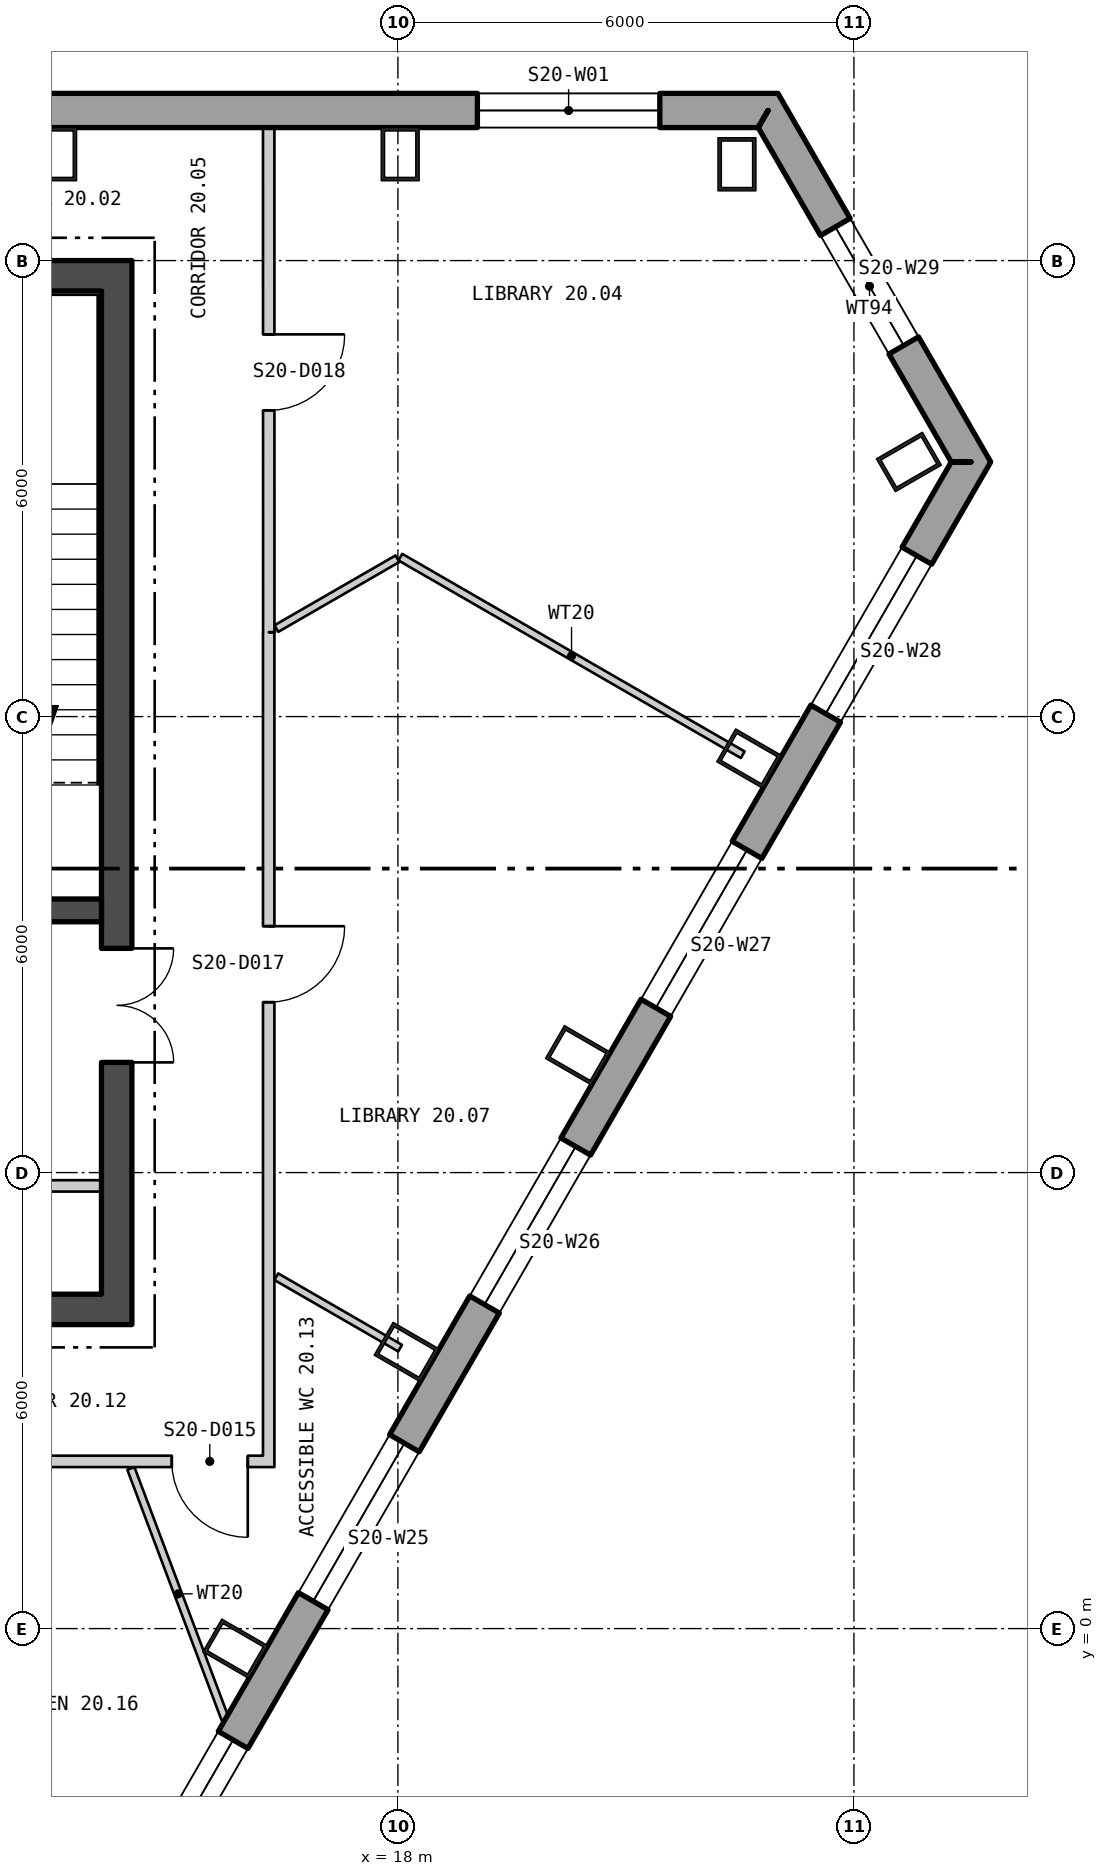
"""IFC4 building model, lengths in metres.
Left out: names, types, materials, properties, quantities, classifications, styles, units other than length and angle.
Written with IfcOpenShell. Run it as: python <this file> out.ifc"""

import sys

from ifc_helpers import new_model, si_unit, direction, frame, frame_2d, origin, origin_2d, place, context, subcontext, project, spatial, polyline, rectangle, hollow_rectangle, outline, extrude, element, fill, save


model = new_model("IFC4")
c1 = context("Model", 3, precision=1e-05, world=origin(), true_north=direction((0.0, 1.0)))
c2 = subcontext(c1, "Body", "Model", "MODEL_VIEW")
j1 = project(units=[si_unit("LENGTHUNIT", "METRE"), si_unit("PLANEANGLEUNIT", "RADIAN")], contexts=[c1])
p1 = place(None, origin())
s1 = spatial("IfcSite", under=j1, at=p1, CompositionType="ELEMENT")
p2 = place(p1, origin())
s2 = spatial("IfcBuilding", under=s1, at=p2, CompositionType="ELEMENT")
p3 = place(p2, frame((0.0, 0.0, 268.8)))
s3 = spatial("IfcBuildingStorey", under=s2, at=p3, CompositionType="ELEMENT", Elevation=268.8)
for number, where, z_axis, x_axis in (
    (1, (22.461, 19.267, 0.0), (0.0, 0.0, 1.0), (-1.0, 0.0, 0.0)),
    (2, (18.03, 19.4, 0.0), (0.0, 0.0, 1.0), (-1.0, 0.0, 0.0)),
    (3, (13.523, 19.4, 0.0), (0.0, 0.0, 1.0), (-1.0, 0.0, 0.0)),
    (4, (15.861, -0.265, 0.0), (0.0, 0.0, 1.0), (0.5, 0.866, 0.0)),
    (5, (18.115, 3.639, 0.0), (0.0, 0.0, 1.0), (0.5, 0.866, 0.0)),
    (6, (20.369, 7.543, 0.0), (0.0, 0.0, 1.0), (0.5, 0.866, 0.0)),
    (7, (22.622, 11.447, 0.0), (0.0, 0.0, 1.0), (0.5, 0.866, 0.0)),
    (8, (24.723, 15.35, 0.0), (0.0, 0.0, 1.0), (-0.5, 0.866, 0.0)),
):
    element("IfcColumn", number, at=place(p3, frame(where, z_axis=z_axis, x_axis=x_axis)), inside=s3, PredefinedType="COLUMN", context=c2, shape_type="SweptSolid", body=[
        extrude(hollow_rectangle(XDim=0.5, YDim=0.7, WallThickness=0.045, at=origin_2d()), origin(), (0.0, 0.0, 1.0), 3.9),
    ])
p4 = place(p3, frame((22.87, 19.975, -0.4), z_axis=(0.0, 0.0, 1.0), x_axis=(-1.0, 0.0, 0.0)))
e9 = element("IfcWall", 9, at=p4, inside=s3, PredefinedType="SOLIDWALL", context=c2, shape_type="SweptSolid", body=[
    extrude(outline(polyline([(-0.13, -0.225), (45.87, -0.225), (45.61, 0.225), (0.13, 0.225), (-0.13, -0.225)])), origin(), (0.0, 0.0, 1.0), 3.9),
])
p5 = place(p4, frame((1.424, 0.0, 1.3)))
e10 = element("IfcOpeningElement", 10, at=p5, cuts=e9, PredefinedType="OPENING", context=c2, shape_type="SweptSolid", body=[
    extrude(rectangle(XDim=2.4, YDim=2.0, at=frame_2d((1.2, 1.0))), frame((0.0, 0.235, 0.0), z_axis=(0.0, -1.0, 0.0), x_axis=(1.0, 0.0, 0.0)), (0.0, 0.0, 1.0), 0.47),
])
p6 = place(p4, frame((14.909, 0.0, 1.3)))
e11 = element("IfcOpeningElement", 11, at=p6, cuts=e9, PredefinedType="OPENING", context=c2, shape_type="SweptSolid", body=[
    extrude(rectangle(XDim=2.4, YDim=2.0, at=frame_2d((1.2, 1.0))), frame((0.0, 0.235, 0.0), z_axis=(0.0, -1.0, 0.0), x_axis=(1.0, 0.0, 0.0)), (0.0, 0.0, 1.0), 0.47),
])
p7 = place(p4, frame((19.416, 0.0, 1.3)))
e12 = element("IfcOpeningElement", 12, at=p7, cuts=e9, PredefinedType="OPENING", context=c2, shape_type="SweptSolid", body=[
    extrude(rectangle(XDim=2.4, YDim=2.0, at=frame_2d((1.2, 1.0))), frame((0.0, 0.235, 0.0), z_axis=(0.0, -1.0, 0.0), x_axis=(1.0, 0.0, 0.0)), (0.0, 0.0, 1.0), 0.47),
])
p8 = place(p4, frame((23.924, 0.0, 1.3)))
e13 = element("IfcOpeningElement", 13, at=p8, cuts=e9, PredefinedType="OPENING", context=c2, shape_type="SweptSolid", body=[
    extrude(rectangle(XDim=2.4, YDim=2.0, at=frame_2d((1.2, 1.0))), frame((0.0, 0.235, 0.0), z_axis=(0.0, -1.0, 0.0), x_axis=(1.0, 0.0, 0.0)), (0.0, 0.0, 1.0), 0.47),
])
p9 = place(p4, frame((28.431, 0.0, 1.3)))
e14 = element("IfcOpeningElement", 14, at=p9, cuts=e9, PredefinedType="OPENING", context=c2, shape_type="SweptSolid", body=[
    extrude(rectangle(XDim=2.4, YDim=2.0, at=frame_2d((1.2, 1.0))), frame((0.0, 0.235, 0.0), z_axis=(0.0, -1.0, 0.0), x_axis=(1.0, 0.0, 0.0)), (0.0, 0.0, 1.0), 0.47),
])
p10 = place(p4, frame((32.939, 0.0, 1.3)))
e15 = element("IfcOpeningElement", 15, at=p10, cuts=e9, PredefinedType="OPENING", context=c2, shape_type="SweptSolid", body=[
    extrude(rectangle(XDim=2.4, YDim=2.0, at=frame_2d((1.2, 1.0))), frame((0.0, 0.235, 0.0), z_axis=(0.0, -1.0, 0.0), x_axis=(1.0, 0.0, 0.0)), (0.0, 0.0, 1.0), 0.47),
])
p11 = place(p4, frame((41.916, 0.0, 1.3)))
e16 = element("IfcOpeningElement", 16, at=p11, cuts=e9, PredefinedType="OPENING", context=c2, shape_type="SweptSolid", body=[
    extrude(rectangle(XDim=2.4, YDim=2.0, at=frame_2d((1.2, 1.0))), frame((0.0, 0.235, 0.0), z_axis=(0.0, -1.0, 0.0), x_axis=(1.0, 0.0, 0.0)), (0.0, 0.0, 1.0), 0.47),
])
p12 = place(p3, frame((2.67, -24.262, -0.18), z_axis=(0.0, 0.0, 1.0), x_axis=(0.499999764979, 0.866025539474, 0.0)))
e17 = element("IfcWall", 17, at=p12, inside=s3, PredefinedType="SOLIDWALL", context=c2, shape_type="SweptSolid", body=[
    extrude(outline(polyline([(-0.13, -0.225), (45.87, -0.225), (45.61, 0.225), (0.13, 0.225), (-0.13, -0.225)])), origin(), (0.0, 0.0, 1.0), 3.68),
])
p13 = place(p12, frame((1.424, 0.0, 1.08)))
e18 = element("IfcOpeningElement", 18, at=p13, cuts=e17, PredefinedType="OPENING", context=c2, shape_type="SweptSolid", body=[
    extrude(rectangle(XDim=2.4, YDim=2.0, at=frame_2d((1.2, 1.0))), frame((0.0, 0.235, 0.0), z_axis=(0.0, -1.0, 0.0), x_axis=(1.0, 0.0, 0.0)), (0.0, 0.0, 1.0), 0.47),
])
p14 = place(p12, frame((5.893, 0.0, 1.08)))
e19 = element("IfcOpeningElement", 19, at=p14, cuts=e17, PredefinedType="OPENING", context=c2, shape_type="SweptSolid", body=[
    extrude(rectangle(XDim=2.4, YDim=2.0, at=frame_2d((1.2, 1.0))), frame((0.0, 0.235, 0.0), z_axis=(0.0, -1.0, 0.0), x_axis=(1.0, 0.0, 0.0)), (0.0, 0.0, 1.0), 0.47),
])
p15 = place(p12, frame((10.401, 0.0, 1.08)))
e20 = element("IfcOpeningElement", 20, at=p15, cuts=e17, PredefinedType="OPENING", context=c2, shape_type="SweptSolid", body=[
    extrude(rectangle(XDim=2.4, YDim=2.0, at=frame_2d((1.2, 1.0))), frame((0.0, 0.235, 0.0), z_axis=(0.0, -1.0, 0.0), x_axis=(1.0, 0.0, 0.0)), (0.0, 0.0, 1.0), 0.47),
])
p16 = place(p12, frame((14.909, 0.0, 1.08)))
e21 = element("IfcOpeningElement", 21, at=p16, cuts=e17, PredefinedType="OPENING", context=c2, shape_type="SweptSolid", body=[
    extrude(rectangle(XDim=2.4, YDim=2.0, at=frame_2d((1.2, 1.0))), frame((0.0, 0.235, 0.0), z_axis=(0.0, -1.0, 0.0), x_axis=(1.0, 0.0, 0.0)), (0.0, 0.0, 1.0), 0.47),
])
p17 = place(p12, frame((23.924, 0.0, 1.08)))
e22 = element("IfcOpeningElement", 22, at=p17, cuts=e17, PredefinedType="OPENING", context=c2, shape_type="SweptSolid", body=[
    extrude(rectangle(XDim=2.4, YDim=2.0, at=frame_2d((1.2, 1.0))), frame((0.0, 0.235, 0.0), z_axis=(0.0, -1.0, 0.0), x_axis=(1.0, 0.0, 0.0)), (0.0, 0.0, 1.0), 0.47),
])
p18 = place(p12, frame((28.431, 0.0, 1.08)))
e23 = element("IfcOpeningElement", 23, at=p18, cuts=e17, PredefinedType="OPENING", context=c2, shape_type="SweptSolid", body=[
    extrude(rectangle(XDim=2.4, YDim=2.0, at=frame_2d((1.2, 1.0))), frame((0.0, 0.235, 0.0), z_axis=(0.0, -1.0, 0.0), x_axis=(1.0, 0.0, 0.0)), (0.0, 0.0, 1.0), 0.47),
])
p19 = place(p12, frame((32.939, 0.0, 1.08)))
e24 = element("IfcOpeningElement", 24, at=p19, cuts=e17, PredefinedType="OPENING", context=c2, shape_type="SweptSolid", body=[
    extrude(rectangle(XDim=2.4, YDim=2.0, at=frame_2d((1.2, 1.0))), frame((0.0, 0.235, 0.0), z_axis=(0.0, -1.0, 0.0), x_axis=(1.0, 0.0, 0.0)), (0.0, 0.0, 1.0), 0.47),
])
p20 = place(p12, frame((37.447, 0.0, 1.08)))
e25 = element("IfcOpeningElement", 25, at=p20, cuts=e17, PredefinedType="OPENING", context=c2, shape_type="SweptSolid", body=[
    extrude(rectangle(XDim=2.4, YDim=2.0, at=frame_2d((1.2, 1.0))), frame((0.0, 0.235, 0.0), z_axis=(0.0, -1.0, 0.0), x_axis=(1.0, 0.0, 0.0)), (0.0, 0.0, 1.0), 0.47),
])
p21 = place(p12, frame((41.916, 0.0, 1.08)))
e26 = element("IfcOpeningElement", 26, at=p21, cuts=e17, PredefinedType="OPENING", context=c2, shape_type="SweptSolid", body=[
    extrude(rectangle(XDim=2.4, YDim=2.0, at=frame_2d((1.2, 1.0))), frame((0.0, 0.235, 0.0), z_axis=(0.0, -1.0, 0.0), x_axis=(1.0, 0.0, 0.0)), (0.0, 0.0, 1.0), 0.47),
])
p22 = place(p3, frame((25.54, 15.35, -0.4), z_axis=(0.0, 0.0, 1.0), x_axis=(-0.500003961967, 0.866023116329, 0.0)))
e27 = element("IfcWall", 27, at=p22, inside=s3, PredefinedType="SOLIDWALL", context=c2, shape_type="SweptSolid", body=[
    extrude(outline(polyline([(-0.13, -0.225), (5.47, -0.225), (5.21, 0.225), (0.13, 0.225), (-0.13, -0.225)])), origin(), (0.0, 0.0, 1.0), 3.9),
])
p23 = place(p22, frame((1.77, 0.0, 1.3)))
e28 = element("IfcOpeningElement", 28, at=p23, cuts=e27, PredefinedType="OPENING", context=c2, shape_type="SweptSolid", body=[
    extrude(rectangle(XDim=1.8, YDim=2.0, at=frame_2d((0.9, 1.0))), frame((0.0, 0.235, 0.0), z_axis=(0.0, -1.0, 0.0), x_axis=(1.0, 0.0, 0.0)), (0.0, 0.0, 1.0), 0.47),
])
p24 = place(p3, frame((-14.5, 4.2, 0.0), z_axis=(0.0, 0.0, 1.0), x_axis=(1.0, 0.0, 0.0)))
e29 = element("IfcWall", 29, at=p24, inside=s3, PredefinedType="SHEAR", context=c2, shape_type="SweptSolid", body=[
    extrude(rectangle(XDim=29.0, YDim=0.4, at=frame_2d((14.5, 0.0))), origin(), (0.0, 0.0, 1.0), 3.7),
])
p25 = place(p24, frame((9.0, 0.0, 0.0)))
e30 = element("IfcOpeningElement", 30, at=p25, cuts=e29, PredefinedType="OPENING", context=c2, shape_type="SweptSolid", body=[
    extrude(rectangle(XDim=1.8, YDim=2.4, at=frame_2d((0.9, 1.2))), frame((0.0, 0.21, 0.0), z_axis=(0.0, -1.0, 0.0), x_axis=(1.0, 0.0, 0.0)), (0.0, 0.0, 1.0), 0.42),
])
p26 = place(p24, frame((19.0, 0.0, 0.0)))
e31 = element("IfcOpeningElement", 31, at=p26, cuts=e29, PredefinedType="OPENING", context=c2, shape_type="SweptSolid", body=[
    extrude(rectangle(XDim=1.8, YDim=2.4, at=frame_2d((0.9, 1.2))), frame((0.0, 0.21, 0.0), z_axis=(0.0, -1.0, 0.0), x_axis=(1.0, 0.0, 0.0)), (0.0, 0.0, 1.0), 0.42),
])
p27 = place(p3, frame((-14.5, 17.8, 0.0), z_axis=(0.0, 0.0, 1.0), x_axis=(1.0, 0.0, 0.0)))
e32 = element("IfcWall", 32, at=p27, inside=s3, PredefinedType="SHEAR", context=c2, shape_type="SweptSolid", body=[
    extrude(rectangle(XDim=29.0, YDim=0.4, at=frame_2d((14.5, 0.0))), origin(), (0.0, 0.0, 1.0), 3.7),
])
p28 = place(p3, frame((14.3, 4.4, 0.0), z_axis=(0.0, 0.0, 1.0), x_axis=(0.0, 1.0, 0.0)))
e33 = element("IfcWall", 33, at=p28, inside=s3, PredefinedType="SHEAR", context=c2, shape_type="SweptSolid", body=[
    extrude(rectangle(XDim=13.2, YDim=0.4, at=frame_2d((6.6, 0.0))), origin(), (0.0, 0.0, 1.0), 3.7),
])
p29 = place(p28, frame((3.05, 0.0, 0.0)))
e34 = element("IfcOpeningElement", 34, at=p29, cuts=e33, PredefinedType="OPENING", context=c2, shape_type="SweptSolid", body=[
    extrude(rectangle(XDim=1.5, YDim=2.1, at=frame_2d((0.75, 1.05))), frame((0.0, 0.21, 0.0), z_axis=(0.0, -1.0, 0.0), x_axis=(1.0, 0.0, 0.0)), (0.0, 0.0, 1.0), 0.42),
])
p30 = place(p3, frame((11.0, 9.45, 0.0), z_axis=(0.0, 0.0, 1.0), x_axis=(1.0, 0.0, 0.0)))
e35 = element("IfcWall", 35, at=p30, inside=s3, PredefinedType="SHEAR", context=c2, shape_type="SweptSolid", body=[
    extrude(rectangle(XDim=3.1, YDim=0.3, at=frame_2d((1.55, 0.0))), origin(), (0.0, 0.0, 1.0), 3.7),
])
p31 = place(p30, frame((0.95, 0.0, 0.0)))
e36 = element("IfcOpeningElement", 36, at=p31, cuts=e35, PredefinedType="OPENING", context=c2, shape_type="SweptSolid", body=[
    extrude(rectangle(XDim=1.2, YDim=2.1, at=frame_2d((0.6, 1.05))), frame((0.0, 0.16, 0.0), z_axis=(0.0, -1.0, 0.0), x_axis=(1.0, 0.0, 0.0)), (0.0, 0.0, 1.0), 0.32),
])
p32 = place(p3, frame((11.0, 5.825, 0.0), z_axis=(0.0, 0.0, 1.0), x_axis=(1.0, 0.0, 0.0)))
e37 = element("IfcWall", 37, at=p32, inside=s3, PredefinedType="PARTITIONING", context=c2, shape_type="SweptSolid", body=[
    extrude(rectangle(XDim=3.1, YDim=0.15, at=frame_2d((1.55, 0.0))), origin(), (0.0, 0.0, 1.0), 3.7),
])
p33 = place(p3, frame((7.875, 2.2, 0.0), z_axis=(0.0, 0.0, 1.0), x_axis=(1.0, 0.0, 0.0)))
e38 = element("IfcWall", 38, at=p33, inside=s3, PredefinedType="PARTITIONING", context=c2, shape_type="SweptSolid", body=[
    extrude(rectangle(XDim=8.35, YDim=0.15, at=frame_2d((4.175, 0.0))), origin(), (0.0, 0.0, 1.0), 3.7),
])
p34 = place(p33, frame((3.662, 0.0, 0.0)))
e39 = element("IfcOpeningElement", 39, at=p34, cuts=e38, PredefinedType="OPENING", context=c2, shape_type="SweptSolid", body=[
    extrude(rectangle(XDim=1.0, YDim=2.1, at=frame_2d((0.5, 1.05))), frame((0.0, 0.085, 0.0), z_axis=(0.0, -1.0, 0.0), x_axis=(1.0, 0.0, 0.0)), (0.0, 0.0, 1.0), 0.17),
])
p35 = place(p33, frame((7.15, 0.0, 0.0)))
e40 = element("IfcOpeningElement", 40, at=p35, cuts=e38, PredefinedType="OPENING", context=c2, shape_type="SweptSolid", body=[
    extrude(rectangle(XDim=1.0, YDim=2.1, at=frame_2d((0.5, 1.05))), frame((0.0, 0.085, 0.0), z_axis=(0.0, -1.0, 0.0), x_axis=(1.0, 0.0, 0.0)), (0.0, 0.0, 1.0), 0.17),
])
p36 = place(p3, frame((14.487, 2.107, 0.0), z_axis=(0.0, 0.0, 1.0), x_axis=(0.352242085743, -0.935908923471, 0.0)))
e41 = element("IfcWall", 41, at=p36, inside=s3, PredefinedType="PARTITIONING", context=c2, shape_type="SweptSolid", body=[
    extrude(rectangle(XDim=3.526, YDim=0.1, at=frame_2d((1.763, 0.0))), origin(), (0.0, 0.0, 1.0), 3.7),
])
p37 = place(p3, frame((16.3, 2.125, 0.0), z_axis=(0.0, 0.0, 1.0), x_axis=(0.0, 1.0, 0.0)))
e42 = element("IfcWall", 42, at=p37, inside=s3, PredefinedType="PARTITIONING", context=c2, shape_type="SweptSolid", body=[
    extrude(rectangle(XDim=10.985, YDim=0.15, at=frame_2d((5.492, 0.0))), origin(), (0.0, 0.0, 1.0), 3.7),
])
p38 = place(p37, frame((6.117, 0.0, 0.0)))
e43 = element("IfcOpeningElement", 43, at=p38, cuts=e42, PredefinedType="OPENING", context=c2, shape_type="SweptSolid", body=[
    extrude(rectangle(XDim=1.0, YDim=2.1, at=frame_2d((0.5, 1.05))), frame((0.0, 0.085, 0.0), z_axis=(0.0, -1.0, 0.0), x_axis=(1.0, 0.0, 0.0)), (0.0, 0.0, 1.0), 0.17),
])
p39 = place(p3, frame((16.3, 19.747, 0.0), z_axis=(0.0, 0.0, 1.0), x_axis=(0.000150670482, -0.999999988649, 0.0)))
e44 = element("IfcWall", 44, at=p39, inside=s3, PredefinedType="PARTITIONING", context=c2, shape_type="SweptSolid", body=[
    extrude(rectangle(XDim=6.637, YDim=0.15, at=frame_2d((3.318, 0.0))), origin(), (0.0, 0.0, 1.0), 3.7),
])
p40 = place(p39, frame((2.718, 0.0, 0.0)))
e45 = element("IfcOpeningElement", 45, at=p40, cuts=e44, PredefinedType="OPENING", context=c2, shape_type="SweptSolid", body=[
    extrude(rectangle(XDim=1.0, YDim=2.1, at=frame_2d((0.5, 1.05))), frame((0.0, 0.085, 0.0), z_axis=(0.0, -1.0, 0.0), x_axis=(1.0, 0.0, 0.0)), (0.0, 0.0, 1.0), 0.17),
])
p41 = place(p3, frame((16.4, 4.63, 0.0), z_axis=(0.0, 0.0, 1.0), x_axis=(0.866141323391, -0.49979916758, 0.0)))
e46 = element("IfcWall", 46, at=p41, inside=s3, PredefinedType="PARTITIONING", context=c2, shape_type="SweptSolid", body=[
    extrude(rectangle(XDim=1.881, YDim=0.1, at=frame_2d((0.94, 0.0))), origin(), (0.0, 0.0, 1.0), 3.7),
])
p42 = place(p3, frame((16.401, 13.158, 0.0), z_axis=(0.0, 0.0, 1.0), x_axis=(0.866194638357, 0.499706762492, 0.0)))
e47 = element("IfcWall", 47, at=p42, inside=s3, PredefinedType="PARTITIONING", context=c2, shape_type="SweptSolid", body=[
    extrude(rectangle(XDim=1.839, YDim=0.1, at=frame_2d((0.92, 0.0))), origin(), (0.0, 0.0, 1.0), 3.7),
])
p43 = place(p3, frame((18.032, 14.098, 0.0), z_axis=(0.0, 0.0, 1.0), x_axis=(0.8661055579, -0.499861143294, 0.0)))
e48 = element("IfcWall", 48, at=p43, inside=s3, PredefinedType="PARTITIONING", context=c2, shape_type="SweptSolid", body=[
    extrude(rectangle(XDim=5.201, YDim=0.1, at=frame_2d((2.601, 0.0))), origin(), (0.0, 0.0, 1.0), 3.7),
])
p44 = place(p5, origin())
e49 = element("IfcWindow", 49, at=p44, inside=s3, PartitioningType="SINGLE_PANEL", PredefinedType="WINDOW", context=c2, shape_type="SweptSolid", body=[
    extrude(rectangle(XDim=2.4, YDim=2.0, at=frame_2d((1.2, 1.0))), frame((0.0, 0.105, 0.0), z_axis=(0.0, -1.0, 0.0), x_axis=(1.0, 0.0, 0.0)), (0.0, 0.0, 1.0), 0.06),
])
fill(e10, e49)
p45 = place(p17, origin())
e50 = element("IfcWindow", 50, at=p45, inside=s3, PartitioningType="SINGLE_PANEL", PredefinedType="WINDOW", context=c2, shape_type="SweptSolid", body=[
    extrude(rectangle(XDim=2.4, YDim=2.0, at=frame_2d((1.2, 1.0))), frame((0.0, 0.105, 0.0), z_axis=(0.0, -1.0, 0.0), x_axis=(1.0, 0.0, 0.0)), (0.0, 0.0, 1.0), 0.06),
])
fill(e22, e50)
p46 = place(p18, origin())
e51 = element("IfcWindow", 51, at=p46, inside=s3, PartitioningType="SINGLE_PANEL", PredefinedType="WINDOW", context=c2, shape_type="SweptSolid", body=[
    extrude(rectangle(XDim=2.4, YDim=2.0, at=frame_2d((1.2, 1.0))), frame((0.0, 0.105, 0.0), z_axis=(0.0, -1.0, 0.0), x_axis=(1.0, 0.0, 0.0)), (0.0, 0.0, 1.0), 0.06),
])
fill(e23, e51)
p47 = place(p19, origin())
e52 = element("IfcWindow", 52, at=p47, inside=s3, PartitioningType="SINGLE_PANEL", PredefinedType="WINDOW", context=c2, shape_type="SweptSolid", body=[
    extrude(rectangle(XDim=2.4, YDim=2.0, at=frame_2d((1.2, 1.0))), frame((0.0, 0.105, 0.0), z_axis=(0.0, -1.0, 0.0), x_axis=(1.0, 0.0, 0.0)), (0.0, 0.0, 1.0), 0.06),
])
fill(e24, e52)
p48 = place(p20, origin())
e53 = element("IfcWindow", 53, at=p48, inside=s3, PartitioningType="SINGLE_PANEL", PredefinedType="WINDOW", context=c2, shape_type="SweptSolid", body=[
    extrude(rectangle(XDim=2.4, YDim=2.0, at=frame_2d((1.2, 1.0))), frame((0.0, 0.105, 0.0), z_axis=(0.0, -1.0, 0.0), x_axis=(1.0, 0.0, 0.0)), (0.0, 0.0, 1.0), 0.06),
])
fill(e25, e53)
p49 = place(p21, origin())
e54 = element("IfcWindow", 54, at=p49, inside=s3, PartitioningType="SINGLE_PANEL", PredefinedType="WINDOW", context=c2, shape_type="SweptSolid", body=[
    extrude(rectangle(XDim=2.4, YDim=2.0, at=frame_2d((1.2, 1.0))), frame((0.0, 0.105, 0.0), z_axis=(0.0, -1.0, 0.0), x_axis=(1.0, 0.0, 0.0)), (0.0, 0.0, 1.0), 0.06),
])
fill(e26, e54)
p50 = place(p23, origin())
e55 = element("IfcWindow", 55, at=p50, inside=s3, PartitioningType="SINGLE_PANEL", PredefinedType="WINDOW", context=c2, shape_type="SweptSolid", body=[
    extrude(rectangle(XDim=1.8, YDim=2.0, at=frame_2d((0.9, 1.0))), frame((0.0, 0.105, 0.0), z_axis=(0.0, -1.0, 0.0), x_axis=(1.0, 0.0, 0.0)), (0.0, 0.0, 1.0), 0.06),
])
fill(e28, e55)
p51 = place(p29, origin())
e56 = element("IfcDoor", 56, at=p51, inside=s3, OperationType="DOUBLE_DOOR_SINGLE_SWING", PredefinedType="DOOR", context=c2, shape_type="SweptSolid", body=[
    extrude(rectangle(XDim=1.5, YDim=2.1, at=frame_2d((0.75, 1.05))), frame((0.0, 0.025, 0.0), z_axis=(0.0, -1.0, 0.0), x_axis=(1.0, 0.0, 0.0)), (0.0, 0.0, 1.0), 0.05),
])
fill(e34, e56)
p52 = place(p35, origin())
e57 = element("IfcDoor", 57, at=p52, inside=s3, OperationType="SINGLE_SWING_RIGHT", PredefinedType="DOOR", context=c2, shape_type="SweptSolid", body=[
    extrude(rectangle(XDim=1.0, YDim=2.1, at=frame_2d((0.5, 1.05))), frame((0.0, 0.025, 0.0), z_axis=(0.0, -1.0, 0.0), x_axis=(1.0, 0.0, 0.0)), (0.0, 0.0, 1.0), 0.05),
])
fill(e40, e57)
p53 = place(p38, origin())
e58 = element("IfcDoor", 58, at=p53, inside=s3, OperationType="SINGLE_SWING_RIGHT", PredefinedType="DOOR", context=c2, shape_type="SweptSolid", body=[
    extrude(rectangle(XDim=1.0, YDim=2.1, at=frame_2d((0.5, 1.05))), frame((0.0, 0.025, 0.0), z_axis=(0.0, -1.0, 0.0), x_axis=(1.0, 0.0, 0.0)), (0.0, 0.0, 1.0), 0.05),
])
fill(e43, e58)
p54 = place(p40, origin())
e59 = element("IfcDoor", 59, at=p54, inside=s3, OperationType="SINGLE_SWING_RIGHT", PredefinedType="DOOR", context=c2, shape_type="SweptSolid", body=[
    extrude(rectangle(XDim=1.0, YDim=2.1, at=frame_2d((0.5, 1.05))), frame((0.0, 0.025, 0.0), z_axis=(0.0, -1.0, 0.0), x_axis=(1.0, 0.0, 0.0)), (0.0, 0.0, 1.0), 0.05),
])
fill(e45, e59)
save(model, sys.argv[1])
